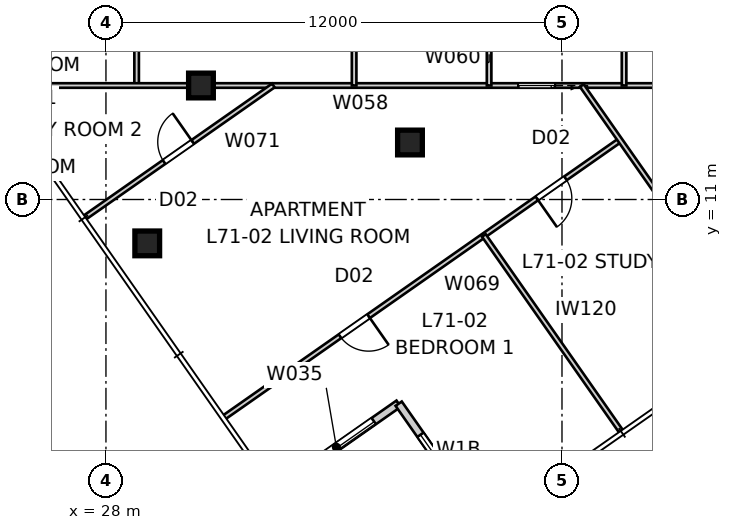
"""IFC4 building model, lengths in metres.
Left out: names, types, materials, properties, quantities, classifications, styles, units other than length and angle.
Written with IfcOpenShell. Run it as: python <this file> out.ifc"""

import sys

from ifc_helpers import new_model, si_unit, direction, frame, frame_2d, origin, origin_2d, place, context, subcontext, project, spatial, rectangle, extrude, element, fill, save


model = new_model("IFC4")
c1 = context("Model", 3, precision=1e-05, world=origin(), true_north=direction((0.0, 1.0)))
c2 = subcontext(c1, "Body", "Model", "MODEL_VIEW")
j1 = project(units=[si_unit("LENGTHUNIT", "METRE"), si_unit("PLANEANGLEUNIT", "RADIAN")], contexts=[c1])
p1 = place(None, origin())
s1 = spatial("IfcSite", under=j1, at=p1, CompositionType="ELEMENT")
p2 = place(p1, origin())
s2 = spatial("IfcBuilding", under=s1, at=p2, CompositionType="ELEMENT")
p3 = place(p2, frame((0.0, 0.0, 257.4)))
s3 = spatial("IfcBuildingStorey", under=s2, at=p3, CompositionType="ELEMENT", Elevation=257.4)
for number, where, z_axis, x_axis in (
    (1, (29.086, 9.845, 0.0), (0.0, 0.0, 1.0), (1.0, 0.0, 0.0)),
    (2, (30.5, 14.0, 0.0), (0.0, 0.0, 1.0), (1.0, 0.0, 0.0)),
    (3, (36.0, 12.5, 0.0), (0.0, 0.0, 1.0), (1.0, 0.0, 0.0)),
):
    element("IfcColumn", number, at=place(p3, frame(where, z_axis=z_axis, x_axis=x_axis)), inside=s3, PredefinedType="COLUMN", context=c2, shape_type="SweptSolid", body=[
        extrude(rectangle(XDim=0.65, YDim=0.65, at=origin_2d()), origin(), (0.0, 0.0, 1.0), 3.4),
    ])
p4 = place(p3, frame((32.426, 3.333, 0.0), z_axis=(0.0, 0.0, 1.0), x_axis=(0.819165963305, 0.573556557423, 0.0)))
e4 = element("IfcWall", 4, at=p4, inside=s3, PredefinedType="SOLIDWALL", context=c2, shape_type="SweptSolid", body=[
    extrude(rectangle(XDim=4.0, YDim=0.2, at=frame_2d((2.0, 0.0))), origin(), (0.0, 0.0, 1.0), 3.25),
])
p5 = place(p4, frame((0.8, 0.0, 0.0)))
e5 = element("IfcOpeningElement", 5, at=p5, cuts=e4, PredefinedType="OPENING", context=c2, shape_type="SweptSolid", body=[
    extrude(rectangle(XDim=2.4, YDim=2.1, at=frame_2d((1.2, 1.05))), frame((0.0, 0.11, 0.0), z_axis=(0.0, -1.0, 0.0), x_axis=(1.0, 0.0, 0.0)), (0.0, 0.0, 1.0), 0.22),
])
p6 = place(p3, frame((35.702, 5.627, 0.0), z_axis=(0.0, 0.0, 1.0), x_axis=(0.573597512525, -0.819137286189, 0.0)))
e6 = element("IfcWall", 6, at=p6, inside=s3, PredefinedType="SOLIDWALL", context=c2, shape_type="SweptSolid", body=[
    extrude(rectangle(XDim=4.0, YDim=0.2, at=frame_2d((2.0, 0.0))), origin(), (0.0, 0.0, 1.0), 3.25),
])
p7 = place(p6, frame((1.0, 0.0, 0.45)))
e7 = element("IfcOpeningElement", 7, at=p7, cuts=e6, PredefinedType="OPENING", context=c2, shape_type="SweptSolid", body=[
    extrude(rectangle(XDim=2.0, YDim=1.8, at=frame_2d((1.0, 0.9))), frame((0.0, 0.11, 0.0), z_axis=(0.0, -1.0, 0.0), x_axis=(1.0, 0.0, 0.0)), (0.0, 0.0, 1.0), 0.22),
])
p8 = place(p3, frame((28.807, 17.041, 0.0), z_axis=(0.0, 0.0, 1.0), x_axis=(0.0, -1.0, 0.0)))
e8 = element("IfcWall", 8, at=p8, inside=s3, PredefinedType="PARTITIONING", context=c2, shape_type="SweptSolid", body=[
    extrude(rectangle(XDim=3.041, YDim=0.12, at=frame_2d((1.521, 0.0))), origin(), (0.0, 0.0, 1.0), 3.25),
])
p9 = place(p8, frame((1.041, 0.0, 0.0)))
e9 = element("IfcOpeningElement", 9, at=p9, cuts=e8, PredefinedType="OPENING", context=c2, shape_type="SweptSolid", body=[
    extrude(rectangle(XDim=0.96, YDim=2.1, at=frame_2d((0.48, 1.05))), frame((0.0, 0.07, 0.0), z_axis=(0.0, -1.0, 0.0), x_axis=(1.0, 0.0, 0.0)), (0.0, 0.0, 1.0), 0.14),
])
p10 = place(p3, frame((47.476, 14.0, 0.0), z_axis=(0.0, 0.0, 1.0), x_axis=(-1.0, 0.0, 0.0)))
e10 = element("IfcWall", 10, at=p10, inside=s3, PredefinedType="PARTITIONING", context=c2, shape_type="SweptSolid", body=[
    extrude(rectangle(XDim=22.471, YDim=0.12, at=frame_2d((11.235, 0.0))), origin(), (0.0, 0.0, 1.0), 2.55),
])
p11 = place(p10, frame((7.664, 0.0, 0.0)))
e11 = element("IfcOpeningElement", 11, at=p11, cuts=e10, PredefinedType="OPENING", context=c2, shape_type="SweptSolid", body=[
    extrude(rectangle(XDim=0.96, YDim=2.1, at=frame_2d((0.48, 1.05))), frame((0.0, 0.07, 0.0), z_axis=(0.0, -1.0, 0.0), x_axis=(1.0, 0.0, 0.0)), (0.0, 0.0, 1.0), 0.14),
])
p12 = place(p3, frame((34.53, 17.9, 0.0), z_axis=(0.0, 0.0, 1.0), x_axis=(0.0, -1.0, 0.0)))
e12 = element("IfcWall", 12, at=p12, inside=s3, PredefinedType="PARTITIONING", context=c2, shape_type="SweptSolid", body=[
    extrude(rectangle(XDim=3.9, YDim=0.12, at=frame_2d((1.95, 0.0))), origin(), (0.0, 0.0, 1.0), 3.25),
])
p13 = place(p12, frame((1.47, 0.0, 0.0)))
e13 = element("IfcOpeningElement", 13, at=p13, cuts=e12, PredefinedType="OPENING", context=c2, shape_type="SweptSolid", body=[
    extrude(rectangle(XDim=0.96, YDim=2.1, at=frame_2d((0.48, 1.05))), frame((0.0, 0.07, 0.0), z_axis=(0.0, -1.0, 0.0), x_axis=(1.0, 0.0, 0.0)), (0.0, 0.0, 1.0), 0.14),
])
p14 = place(p3, frame((38.082, 14.0, 0.0), z_axis=(0.0, 0.0, 1.0), x_axis=(0.0, 1.0, 0.0)))
e14 = element("IfcWall", 14, at=p14, inside=s3, PredefinedType="PARTITIONING", context=c2, shape_type="SweptSolid", body=[
    extrude(rectangle(XDim=3.9, YDim=0.12, at=frame_2d((1.95, 0.0))), origin(), (0.0, 0.0, 1.0), 3.25),
])
p15 = place(p14, frame((1.47, 0.0, 0.0)))
e15 = element("IfcOpeningElement", 15, at=p15, cuts=e14, PredefinedType="OPENING", context=c2, shape_type="SweptSolid", body=[
    extrude(rectangle(XDim=0.96, YDim=2.1, at=frame_2d((0.48, 1.05))), frame((0.0, 0.07, 0.0), z_axis=(0.0, -1.0, 0.0), x_axis=(1.0, 0.0, 0.0)), (0.0, 0.0, 1.0), 0.14),
])
p16 = place(p3, frame((41.634, 17.9, 0.0), z_axis=(0.0, 0.0, 1.0), x_axis=(0.0, -1.0, 0.0)))
e16 = element("IfcWall", 16, at=p16, inside=s3, PredefinedType="PARTITIONING", context=c2, shape_type="SweptSolid", body=[
    extrude(rectangle(XDim=3.9, YDim=0.12, at=frame_2d((1.95, 0.0))), origin(), (0.0, 0.0, 1.0), 3.25),
])
p17 = place(p16, frame((1.47, 0.0, 0.0)))
e17 = element("IfcOpeningElement", 17, at=p17, cuts=e16, PredefinedType="OPENING", context=c2, shape_type="SweptSolid", body=[
    extrude(rectangle(XDim=0.96, YDim=2.1, at=frame_2d((0.48, 1.05))), frame((0.0, 0.07, 0.0), z_axis=(0.0, -1.0, 0.0), x_axis=(1.0, 0.0, 0.0)), (0.0, 0.0, 1.0), 0.14),
])
p18 = place(p3, frame((41.528, 12.562, 0.0), z_axis=(0.0, 0.0, 1.0), x_axis=(-0.819146182185, -0.573584808212, 0.0)))
e18 = element("IfcWall", 18, at=p18, inside=s3, PredefinedType="PARTITIONING", context=c2, shape_type="SweptSolid", body=[
    extrude(rectangle(XDim=12.71, YDim=0.12, at=frame_2d((6.355, 0.0))), origin(), (0.0, 0.0, 1.0), 3.25),
])
p19 = place(p18, frame((8.077, 0.0, 0.0)))
e19 = element("IfcOpeningElement", 19, at=p19, cuts=e18, PredefinedType="OPENING", context=c2, shape_type="SweptSolid", body=[
    extrude(rectangle(XDim=0.92, YDim=2.34, at=frame_2d((0.46, 1.17))), frame((0.0, 0.07, 0.0), z_axis=(0.0, -1.0, 0.0), x_axis=(1.0, 0.0, 0.0)), (0.0, 0.0, 1.0), 0.14),
])
p20 = place(p18, frame((1.752, 0.0, 0.0)))
e20 = element("IfcOpeningElement", 20, at=p20, cuts=e18, PredefinedType="OPENING", context=c2, shape_type="SweptSolid", body=[
    extrude(rectangle(XDim=0.92, YDim=2.34, at=frame_2d((0.46, 1.17))), frame((0.0, 0.07, 0.0), z_axis=(0.0, -1.0, 0.0), x_axis=(1.0, 0.0, 0.0)), (0.0, 0.0, 1.0), 0.14),
])
p21 = place(p3, frame((40.521, 14.0, 0.0), z_axis=(0.0, 0.0, 1.0), x_axis=(0.573574225095, -0.819153592623, 0.0)))
e21 = element("IfcWall", 21, at=p21, inside=s3, PredefinedType="PARTITIONING", context=c2, shape_type="SweptSolid", body=[
    extrude(rectangle(XDim=8.054, YDim=0.12, at=frame_2d((4.027, 0.0))), origin(), (0.0, 0.0, 1.0), 3.25),
])
p22 = place(p3, frame((27.44, 10.523, 0.0), z_axis=(0.0, 0.0, 1.0), x_axis=(0.81915432861, 0.573573173989, 0.0)))
e22 = element("IfcWall", 22, at=p22, inside=s3, PredefinedType="PARTITIONING", context=c2, shape_type="SweptSolid", body=[
    extrude(rectangle(XDim=6.061, YDim=0.12, at=frame_2d((3.031, 0.0))), origin(), (0.0, 0.0, 1.0), 3.25),
])
p23 = place(p22, frame((2.551, 0.0, 0.0)))
e23 = element("IfcOpeningElement", 23, at=p23, cuts=e22, PredefinedType="OPENING", context=c2, shape_type="SweptSolid", body=[
    extrude(rectangle(XDim=0.92, YDim=2.34, at=frame_2d((0.46, 1.17))), frame((0.0, 0.07, 0.0), z_axis=(0.0, -1.0, 0.0), x_axis=(1.0, 0.0, 0.0)), (0.0, 0.0, 1.0), 0.14),
])
p24 = place(p3, frame((37.944, 10.053, 0.0), z_axis=(0.0, 0.0, 1.0), x_axis=(0.573587188897, -0.81914451517, 0.0)))
e24 = element("IfcWall", 24, at=p24, inside=s3, PredefinedType="PARTITIONING", context=c2, shape_type="SweptSolid", body=[
    extrude(rectangle(XDim=6.3, YDim=0.12, at=frame_2d((3.15, 0.0))), origin(), (0.0, 0.0, 1.0), 3.25),
])
p25 = place(p5, origin())
e25 = element("IfcDoor", 25, at=p25, inside=s3, OperationType="SLIDING_TO_LEFT", PredefinedType="DOOR", context=c2, shape_type="SweptSolid", body=[
    extrude(rectangle(XDim=2.4, YDim=2.1, at=frame_2d((1.2, 1.05))), frame((0.0, 0.025, 0.0), z_axis=(0.0, -1.0, 0.0), x_axis=(1.0, 0.0, 0.0)), (0.0, 0.0, 1.0), 0.05),
])
fill(e5, e25)
p26 = place(p7, origin())
e26 = element("IfcWindow", 26, at=p26, inside=s3, PartitioningType="SINGLE_PANEL", PredefinedType="WINDOW", context=c2, shape_type="SweptSolid", body=[
    extrude(rectangle(XDim=2.0, YDim=1.8, at=frame_2d((1.0, 0.9))), frame((0.0, 0.03, 0.0), z_axis=(0.0, -1.0, 0.0), x_axis=(1.0, 0.0, 0.0)), (0.0, 0.0, 1.0), 0.06),
])
fill(e7, e26)
p27 = place(p11, origin())
e27 = element("IfcDoor", 27, at=p27, inside=s3, OperationType="SLIDING_TO_LEFT", PredefinedType="DOOR", context=c2, shape_type="SweptSolid", body=[
    extrude(rectangle(XDim=0.96, YDim=2.1, at=frame_2d((0.48, 1.05))), frame((0.0, 0.025, 0.0), z_axis=(0.0, -1.0, 0.0), x_axis=(1.0, 0.0, 0.0)), (0.0, 0.0, 1.0), 0.05),
])
fill(e11, e27)
p28 = place(p19, origin())
e28 = element("IfcDoor", 28, at=p28, inside=s3, OperationType="SINGLE_SWING_LEFT", PredefinedType="DOOR", context=c2, shape_type="SweptSolid", body=[
    extrude(rectangle(XDim=0.92, YDim=2.34, at=frame_2d((0.46, 1.17))), frame((0.0, 0.025, 0.0), z_axis=(0.0, -1.0, 0.0), x_axis=(1.0, 0.0, 0.0)), (0.0, 0.0, 1.0), 0.05),
])
fill(e19, e28)
p29 = place(p23, origin())
e29 = element("IfcDoor", 29, at=p29, inside=s3, OperationType="SINGLE_SWING_RIGHT", PredefinedType="DOOR", context=c2, shape_type="SweptSolid", body=[
    extrude(rectangle(XDim=0.92, YDim=2.34, at=frame_2d((0.46, 1.17))), frame((0.0, 0.025, 0.0), z_axis=(0.0, -1.0, 0.0), x_axis=(1.0, 0.0, 0.0)), (0.0, 0.0, 1.0), 0.05),
])
fill(e23, e29)
p30 = place(p20, origin())
e30 = element("IfcDoor", 30, at=p30, inside=s3, OperationType="SINGLE_SWING_RIGHT", PredefinedType="DOOR", context=c2, shape_type="SweptSolid", body=[
    extrude(rectangle(XDim=0.92, YDim=2.34, at=frame_2d((0.46, 1.17))), frame((0.0, 0.025, 0.0), z_axis=(0.0, -1.0, 0.0), x_axis=(1.0, 0.0, 0.0)), (0.0, 0.0, 1.0), 0.05),
])
fill(e20, e30)
save(model, sys.argv[1])
